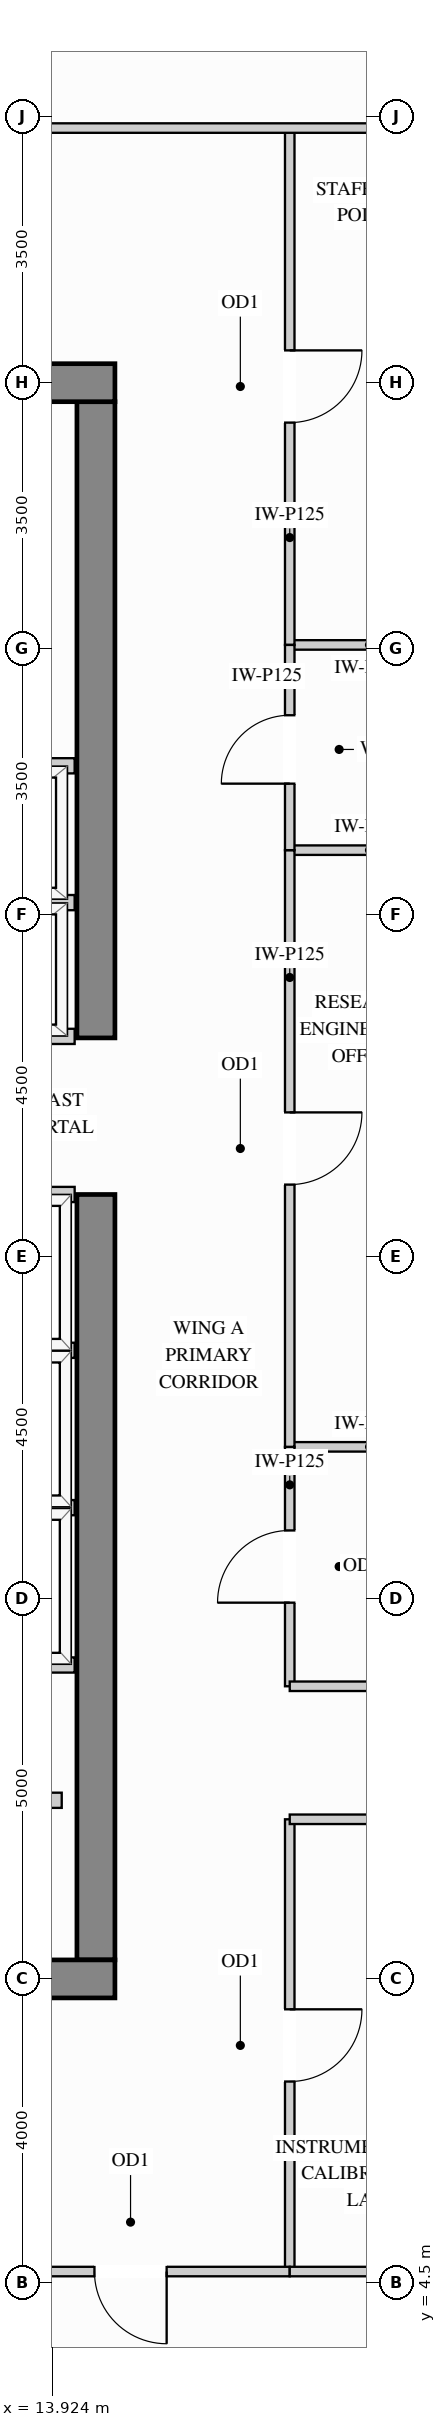
"""IFC4 building model, lengths in metres.
Left out: names, types, materials, properties, quantities, classifications, styles, units other than length and angle.
Written with IfcOpenShell. Run it as: python <this file> out.ifc"""

import sys

from ifc_helpers import new_model, si_unit, direction, frame, frame_2d, origin, place, context, subcontext, project, spatial, rectangle, extrude, source, transform, mapped, element, fill, save


model = new_model("IFC4")
c1 = context("Model", 3, precision=1e-05, world=origin(), true_north=direction((0.0, 1.0)))
c2 = subcontext(c1, "Body", "Model", "MODEL_VIEW")
j1 = project(units=[si_unit("LENGTHUNIT", "METRE"), si_unit("PLANEANGLEUNIT", "RADIAN")], contexts=[c1])
p1 = place(None, origin())
s1 = spatial("IfcSite", under=j1, at=p1, CompositionType="ELEMENT")
p2 = place(p1, origin())
s2 = spatial("IfcBuilding", under=s1, at=p2, CompositionType="ELEMENT")
p3 = place(p2, frame((0.0, 0.0, 230.4)))
s3 = spatial("IfcBuildingStorey", under=s2, at=p3, CompositionType="ELEMENT", Elevation=230.4)
m1 = source(origin(), c2, "Body", "SweptSolid", [
    extrude(rectangle(XDim=10.07, YDim=0.5, at=frame_2d((5.035, 0.0))), origin(), (0.0, 0.0, 1.0), 3.4),
])
p4 = place(p3, frame((14.5, 8.75, 0.0), z_axis=(0.0, 0.0, 1.0), x_axis=(0.0, 1.0, 0.0)))
e1 = element("IfcWall", 1, at=p4, inside=s3, PredefinedType="SHEAR", context=c2, shape_type="MappedRepresentation", body=[
    mapped(m1, transform((0.0, 0.0, 0.0), x_axis=(1.0, 0.0, 0.0), y_axis=(0.0, 1.0, 0.0), z_axis=(0.0, 0.0, 1.0))),
])
m2 = source(origin(), c2, "Body", "SweptSolid", [
    extrude(rectangle(XDim=8.37, YDim=0.5, at=frame_2d((4.185, 0.0))), origin(), (0.0, 0.0, 1.0), 3.4),
])
p5 = place(p3, frame((14.5, 20.88, 0.0), z_axis=(0.0, 0.0, 1.0), x_axis=(0.0, 1.0, 0.0)))
e2 = element("IfcWall", 2, at=p5, inside=s3, PredefinedType="SHEAR", context=c2, shape_type="MappedRepresentation", body=[
    mapped(m2, transform((0.0, 0.0, 0.0), x_axis=(1.0, 0.0, 0.0), y_axis=(0.0, 1.0, 0.0), z_axis=(0.0, 0.0, 1.0))),
])
m3 = source(origin(), c2, "Body", "SweptSolid", [
    extrude(rectangle(XDim=10.5, YDim=0.5, at=frame_2d((5.25, 0.0))), origin(), (0.0, 0.0, 1.0), 3.4),
])
for number, where, z_axis, x_axis in (
    (3, (4.25, 29.5, 0.0), (0.0, 0.0, 1.0), (1.0, 0.0, 0.0)),
    (4, (4.25, 8.5, 0.0), (0.0, 0.0, 1.0), (1.0, 0.0, 0.0)),
):
    element("IfcWall", number, at=place(p3, frame(where, z_axis=z_axis, x_axis=x_axis)), inside=s3, PredefinedType="SHEAR", context=c2, shape_type="MappedRepresentation", body=[
        mapped(m3, transform((0.0, 0.0, 0.0), x_axis=(1.0, 0.0, 0.0), y_axis=(0.0, 1.0, 0.0), z_axis=(0.0, 0.0, 1.0))),
    ])
m4 = source(origin(), c2, "Body", "SweptSolid", [
    extrude(rectangle(XDim=2.1, YDim=0.125, at=frame_2d((1.05, 0.0))), origin(), (0.0, 0.0, 1.0), 3.385),
])
p6 = place(p3, frame((17.05, 15.5, 0.0), z_axis=(0.0, 0.0, 1.0), x_axis=(1.0, 0.0, 0.0)))
e5 = element("IfcWall", 5, at=p6, inside=s3, PredefinedType="PARTITIONING", context=c2, shape_type="MappedRepresentation", body=[
    mapped(m4, transform((0.0, 0.0, 0.0), x_axis=(1.0, 0.0, 0.0), y_axis=(0.0, 1.0, 0.0), z_axis=(0.0, 0.0, 1.0))),
])
m5 = source(origin(), c2, "Body", "SweptSolid", [
    extrude(rectangle(XDim=2.098, YDim=0.125, at=frame_2d((1.049, 0.0))), origin(), (0.0, 0.0, 1.0), 3.385),
])
for number, where, z_axis, x_axis in (
    (6, (17.05, 23.35, 0.0), (0.0, 0.0, 1.0), (1.0, 0.0, 0.0)),
    (7, (17.05, 26.05, 0.0), (0.0, 0.0, 1.0), (1.0, 0.0, 0.0)),
):
    element("IfcWall", number, at=place(p3, frame(where, z_axis=z_axis, x_axis=x_axis)), inside=s3, PredefinedType="PARTITIONING", context=c2, shape_type="MappedRepresentation", body=[
        mapped(m5, transform((0.0, 0.0, 0.0), x_axis=(1.0, 0.0, 0.0), y_axis=(0.0, 1.0, 0.0), z_axis=(0.0, 0.0, 1.0))),
    ])
p7 = place(p3, frame((17.05, 12.35, 0.0), z_axis=(0.0, 0.0, 1.0), x_axis=(0.0, 1.0, 0.0)))
e8 = element("IfcWall", 8, at=p7, inside=s3, PredefinedType="PARTITIONING", context=c2, shape_type="SweptSolid", body=[
    extrude(rectangle(XDim=3.15, YDim=0.125, at=frame_2d((1.575, 0.0))), origin(), (0.0, 0.0, 1.0), 3.385),
])
p8 = place(p7, frame((1.1, 0.0, 0.0)))
e9 = element("IfcOpeningElement", 9, at=p8, cuts=e8, PredefinedType="OPENING", context=c2, shape_type="SweptSolid", body=[
    extrude(rectangle(XDim=0.95, YDim=2.15, at=frame_2d((0.475, 1.075))), frame((0.0, 0.073, 0.0), z_axis=(0.0, -1.0, 0.0), x_axis=(1.0, 0.0, 0.0)), (0.0, 0.0, 1.0), 0.145),
])
p9 = place(p3, frame((17.05, 15.5, 0.0), z_axis=(0.0, 0.0, 1.0), x_axis=(0.0, 1.0, 0.0)))
e10 = element("IfcWall", 10, at=p9, inside=s3, PredefinedType="PARTITIONING", context=c2, shape_type="SweptSolid", body=[
    extrude(rectangle(XDim=7.85, YDim=0.125, at=frame_2d((3.925, 0.0))), origin(), (0.0, 0.0, 1.0), 3.385),
])
p10 = place(p9, frame((3.45, 0.0, 0.0)))
e11 = element("IfcOpeningElement", 11, at=p10, cuts=e10, PredefinedType="OPENING", context=c2, shape_type="SweptSolid", body=[
    extrude(rectangle(XDim=0.95, YDim=2.15, at=frame_2d((0.475, 1.075))), frame((0.0, 0.073, 0.0), z_axis=(0.0, -1.0, 0.0), x_axis=(1.0, 0.0, 0.0)), (0.0, 0.0, 1.0), 0.145),
])
p11 = place(p3, frame((17.05, 26.05, 0.0), z_axis=(0.0, 0.0, 1.0), x_axis=(0.0, 1.0, 0.0)))
e12 = element("IfcWall", 12, at=p11, inside=s3, PredefinedType="PARTITIONING", context=c2, shape_type="SweptSolid", body=[
    extrude(rectangle(XDim=6.8, YDim=0.125, at=frame_2d((3.4, 0.0))), origin(), (0.0, 0.0, 1.0), 3.385),
])
p12 = place(p11, frame((2.925, 0.0, 0.0)))
e13 = element("IfcOpeningElement", 13, at=p12, cuts=e12, PredefinedType="OPENING", context=c2, shape_type="SweptSolid", body=[
    extrude(rectangle(XDim=0.95, YDim=2.15, at=frame_2d((0.475, 1.075))), frame((0.0, 0.073, 0.0), z_axis=(0.0, -1.0, 0.0), x_axis=(1.0, 0.0, 0.0)), (0.0, 0.0, 1.0), 0.145),
])
p13 = place(p3, frame((17.05, 4.65, 0.0), z_axis=(0.0, 0.0, 1.0), x_axis=(0.0, 1.0, 0.0)))
e14 = element("IfcWall", 14, at=p13, inside=s3, PredefinedType="PARTITIONING", context=c2, shape_type="SweptSolid", body=[
    extrude(rectangle(XDim=5.95, YDim=0.125, at=frame_2d((2.975, 0.0))), origin(), (0.0, 0.0, 1.0), 3.385),
])
p14 = place(p13, frame((2.5, 0.0, 0.0)))
e15 = element("IfcOpeningElement", 15, at=p14, cuts=e14, PredefinedType="OPENING", context=c2, shape_type="SweptSolid", body=[
    extrude(rectangle(XDim=0.95, YDim=2.15, at=frame_2d((0.475, 1.075))), frame((0.0, 0.073, 0.0), z_axis=(0.0, -1.0, 0.0), x_axis=(1.0, 0.0, 0.0)), (0.0, 0.0, 1.0), 0.145),
])
p15 = place(p3, frame((17.05, 23.35, 0.0), z_axis=(0.0, 0.0, 1.0), x_axis=(0.0, 1.0, 0.0)))
e16 = element("IfcWall", 16, at=p15, inside=s3, PredefinedType="PARTITIONING", context=c2, shape_type="SweptSolid", body=[
    extrude(rectangle(XDim=2.7, YDim=0.125, at=frame_2d((1.35, 0.0))), origin(), (0.0, 0.0, 1.0), 3.385),
])
p16 = place(p15, frame((0.875, 0.0, 0.0)))
e17 = element("IfcOpeningElement", 17, at=p16, cuts=e16, PredefinedType="OPENING", context=c2, shape_type="SweptSolid", body=[
    extrude(rectangle(XDim=0.9, YDim=2.15, at=frame_2d((0.45, 1.075))), frame((0.0, 0.073, 0.0), z_axis=(0.0, -1.0, 0.0), x_axis=(1.0, 0.0, 0.0)), (0.0, 0.0, 1.0), 0.145),
])
m6 = source(origin(), c2, "Body", "SweptSolid", [
    extrude(rectangle(XDim=12.598, YDim=0.125, at=frame_2d((6.299, 0.0))), origin(), (0.0, 0.0, 1.0), 3.385),
])
p17 = place(p3, frame((6.55, 32.85, 0.0), z_axis=(0.0, 0.0, 1.0), x_axis=(1.0, 0.0, 0.0)))
e18 = element("IfcWall", 18, at=p17, inside=s3, PredefinedType="PARTITIONING", context=c2, shape_type="MappedRepresentation", body=[
    mapped(m6, transform((0.0, 0.0, 0.0), x_axis=(1.0, 0.0, 0.0), y_axis=(0.0, 1.0, 0.0), z_axis=(0.0, 0.0, 1.0))),
])
m7 = source(origin(), c2, "Body", "SweptSolid", [
    extrude(rectangle(XDim=2.45, YDim=0.125, at=frame_2d((1.225, 0.0))), origin(), (0.0, 0.0, 1.0), 3.385),
])
for number, where, z_axis, x_axis in (
    (19, (17.05, 12.35, 0.0), (0.0, 0.0, 1.0), (1.0, 0.0, 0.0)),
    (20, (17.05, 10.6, 0.0), (0.0, 0.0, 1.0), (1.0, 0.0, 0.0)),
):
    element("IfcWall", number, at=place(p3, frame(where, z_axis=z_axis, x_axis=x_axis)), inside=s3, PredefinedType="PARTITIONING", context=c2, shape_type="MappedRepresentation", body=[
        mapped(m7, transform((0.0, 0.0, 0.0), x_axis=(1.0, 0.0, 0.0), y_axis=(0.0, 1.0, 0.0), z_axis=(0.0, 0.0, 1.0))),
    ])
p18 = place(p3, frame((12.861, 4.65, 0.0), z_axis=(0.0, 0.0, 1.0), x_axis=(1.0, 0.0, 0.0)))
e21 = element("IfcWall", 21, at=p18, inside=s3, PredefinedType="PARTITIONING", context=c2, shape_type="SweptSolid", body=[
    extrude(rectangle(XDim=4.189, YDim=0.125, at=frame_2d((2.094, 0.0))), origin(), (0.0, 0.0, 1.0), 2.848),
])
p19 = place(p18, frame((1.619, 0.0, 0.0)))
e22 = element("IfcOpeningElement", 22, at=p19, cuts=e21, PredefinedType="OPENING", context=c2, shape_type="SweptSolid", body=[
    extrude(rectangle(XDim=0.95, YDim=2.15, at=frame_2d((0.475, 1.075))), frame((0.0, 0.073, 0.0), z_axis=(0.0, -1.0, 0.0), x_axis=(1.0, 0.0, 0.0)), (0.0, 0.0, 1.0), 0.145),
])
m8 = source(origin(), c2, "Body", "SweptSolid", [
    extrude(rectangle(XDim=2.098, YDim=0.125, at=frame_2d((1.049, 0.0))), origin(), (0.0, 0.0, 1.0), 2.848),
])
p20 = place(p3, frame((17.05, 4.65, 0.0), z_axis=(0.0, 0.0, 1.0), x_axis=(1.0, 0.0, 0.0)))
e23 = element("IfcWall", 23, at=p20, inside=s3, PredefinedType="PARTITIONING", context=c2, shape_type="MappedRepresentation", body=[
    mapped(m8, transform((0.0, 0.0, 0.0), x_axis=(1.0, 0.0, 0.0), y_axis=(0.0, 1.0, 0.0), z_axis=(0.0, 0.0, 1.0))),
])
m9 = source(origin(), c2, "Body", "SweptSolid", [
    extrude(rectangle(XDim=1.63, YDim=0.2, at=frame_2d((0.815, 0.0))), origin(), (0.0, 0.0, 1.0), 3.385),
])
p21 = place(p3, frame((12.42, 10.85, 0.0), z_axis=(0.0, 0.0, 1.0), x_axis=(1.0, 0.0, 0.0)))
e24 = element("IfcWall", 24, at=p21, inside=s3, PredefinedType="PARTITIONING", context=c2, shape_type="MappedRepresentation", body=[
    mapped(m9, transform((0.0, 0.0, 0.0), x_axis=(1.0, 0.0, 0.0), y_axis=(0.0, 1.0, 0.0), z_axis=(0.0, 0.0, 1.0))),
])
m10 = source(origin(), c2, "Body", "SweptSolid", [
    extrude(rectangle(XDim=2.39, YDim=0.2, at=frame_2d((1.195, 0.0))), origin(), (0.0, 0.0, 1.0), 3.385),
])
for number, where, z_axis, x_axis in (
    (25, (11.83, 22.66, 0.0), (0.0, 0.0, 1.0), (1.0, 0.0, 0.0)),
    (26, (11.83, 20.9, 0.0), (0.0, 0.0, 1.0), (1.0, 0.0, 0.0)),
    (27, (11.83, 24.46, 0.0), (0.0, 0.0, 1.0), (1.0, 0.0, 0.0)),
):
    element("IfcWall", number, at=place(p3, frame(where, z_axis=z_axis, x_axis=x_axis)), inside=s3, PredefinedType="PARTITIONING", context=c2, shape_type="MappedRepresentation", body=[
        mapped(m10, transform((0.0, 0.0, 0.0), x_axis=(1.0, 0.0, 0.0), y_axis=(0.0, 1.0, 0.0), z_axis=(0.0, 0.0, 1.0))),
    ])
m11 = source(origin(), c2, "Body", "SweptSolid", [
    extrude(rectangle(XDim=1.99, YDim=0.2, at=frame_2d((0.995, 0.0))), origin(), (0.0, 0.0, 1.0), 3.385),
])
for number, where, z_axis, x_axis in (
    (28, (12.23, 14.7, 0.0), (0.0, 0.0, 1.0), (1.0, 0.0, 0.0)),
    (29, (12.23, 12.63, 0.0), (0.0, 0.0, 1.0), (1.0, 0.0, 0.0)),
    (30, (12.23, 16.77, 0.0), (0.0, 0.0, 1.0), (1.0, 0.0, 0.0)),
    (31, (12.23, 18.82, 0.0), (0.0, 0.0, 1.0), (1.0, 0.0, 0.0)),
):
    element("IfcWall", number, at=place(p3, frame(where, z_axis=z_axis, x_axis=x_axis)), inside=s3, PredefinedType="PARTITIONING", context=c2, shape_type="MappedRepresentation", body=[
        mapped(m11, transform((0.0, 0.0, 0.0), x_axis=(1.0, 0.0, 0.0), y_axis=(0.0, 1.0, 0.0), z_axis=(0.0, 0.0, 1.0))),
    ])
m12 = source(origin(), c2, "Body", "SweptSolid", [
    extrude(rectangle(XDim=0.95, YDim=2.15, at=frame_2d((0.475, 1.075))), frame((0.0, 0.025, 0.0), z_axis=(0.0, -1.0, 0.0), x_axis=(1.0, 0.0, 0.0)), (0.0, 0.0, 1.0), 0.05),
])
p22 = place(p14, origin())
e32 = element("IfcDoor", 32, at=p22, inside=s3, OperationType="SINGLE_SWING_RIGHT", PredefinedType="DOOR", context=c2, shape_type="MappedRepresentation", body=[
    mapped(m12, transform((0.0, 0.0, 0.0), x_axis=(1.0, 0.0, 0.0), y_axis=(0.0, 1.0, 0.0), z_axis=(0.0, 0.0, 1.0))),
])
fill(e15, e32)
p23 = place(p8, origin())
e33 = element("IfcDoor", 33, at=p23, inside=s3, OperationType="SINGLE_SWING_LEFT", PredefinedType="DOOR", context=c2, shape_type="MappedRepresentation", body=[
    mapped(m12, transform((0.0, 0.0, 0.0), x_axis=(1.0, 0.0, 0.0), y_axis=(0.0, 1.0, 0.0), z_axis=(0.0, 0.0, 1.0))),
])
fill(e9, e33)
p24 = place(p10, origin())
e34 = element("IfcDoor", 34, at=p24, inside=s3, OperationType="SINGLE_SWING_RIGHT", PredefinedType="DOOR", context=c2, shape_type="MappedRepresentation", body=[
    mapped(m12, transform((0.0, 0.0, 0.0), x_axis=(1.0, 0.0, 0.0), y_axis=(0.0, 1.0, 0.0), z_axis=(0.0, 0.0, 1.0))),
])
fill(e11, e34)
p25 = place(p12, origin())
e35 = element("IfcDoor", 35, at=p25, inside=s3, OperationType="SINGLE_SWING_RIGHT", PredefinedType="DOOR", context=c2, shape_type="MappedRepresentation", body=[
    mapped(m12, transform((0.0, 0.0, 0.0), x_axis=(1.0, 0.0, 0.0), y_axis=(0.0, 1.0, 0.0), z_axis=(0.0, 0.0, 1.0))),
])
fill(e13, e35)
p26 = place(p19, origin())
e36 = element("IfcDoor", 36, at=p26, inside=s3, OperationType="SINGLE_SWING_RIGHT", PredefinedType="DOOR", context=c2, shape_type="MappedRepresentation", body=[
    mapped(m12, transform((0.0, 0.0, 0.0), x_axis=(1.0, 0.0, 0.0), y_axis=(0.0, 1.0, 0.0), z_axis=(0.0, 0.0, 1.0))),
])
fill(e22, e36)
m13 = source(origin(), c2, "Body", "SweptSolid", [
    extrude(rectangle(XDim=0.9, YDim=2.15, at=frame_2d((0.45, 1.075))), frame((0.0, 0.025, 0.0), z_axis=(0.0, -1.0, 0.0), x_axis=(1.0, 0.0, 0.0)), (0.0, 0.0, 1.0), 0.05),
])
p27 = place(p16, origin())
e37 = element("IfcDoor", 37, at=p27, inside=s3, OperationType="SINGLE_SWING_LEFT", PredefinedType="DOOR", context=c2, shape_type="MappedRepresentation", body=[
    mapped(m13, transform((0.0, 0.0, 0.0), x_axis=(1.0, 0.0, 0.0), y_axis=(0.0, 1.0, 0.0), z_axis=(0.0, 0.0, 1.0))),
])
fill(e17, e37)
save(model, sys.argv[1])
